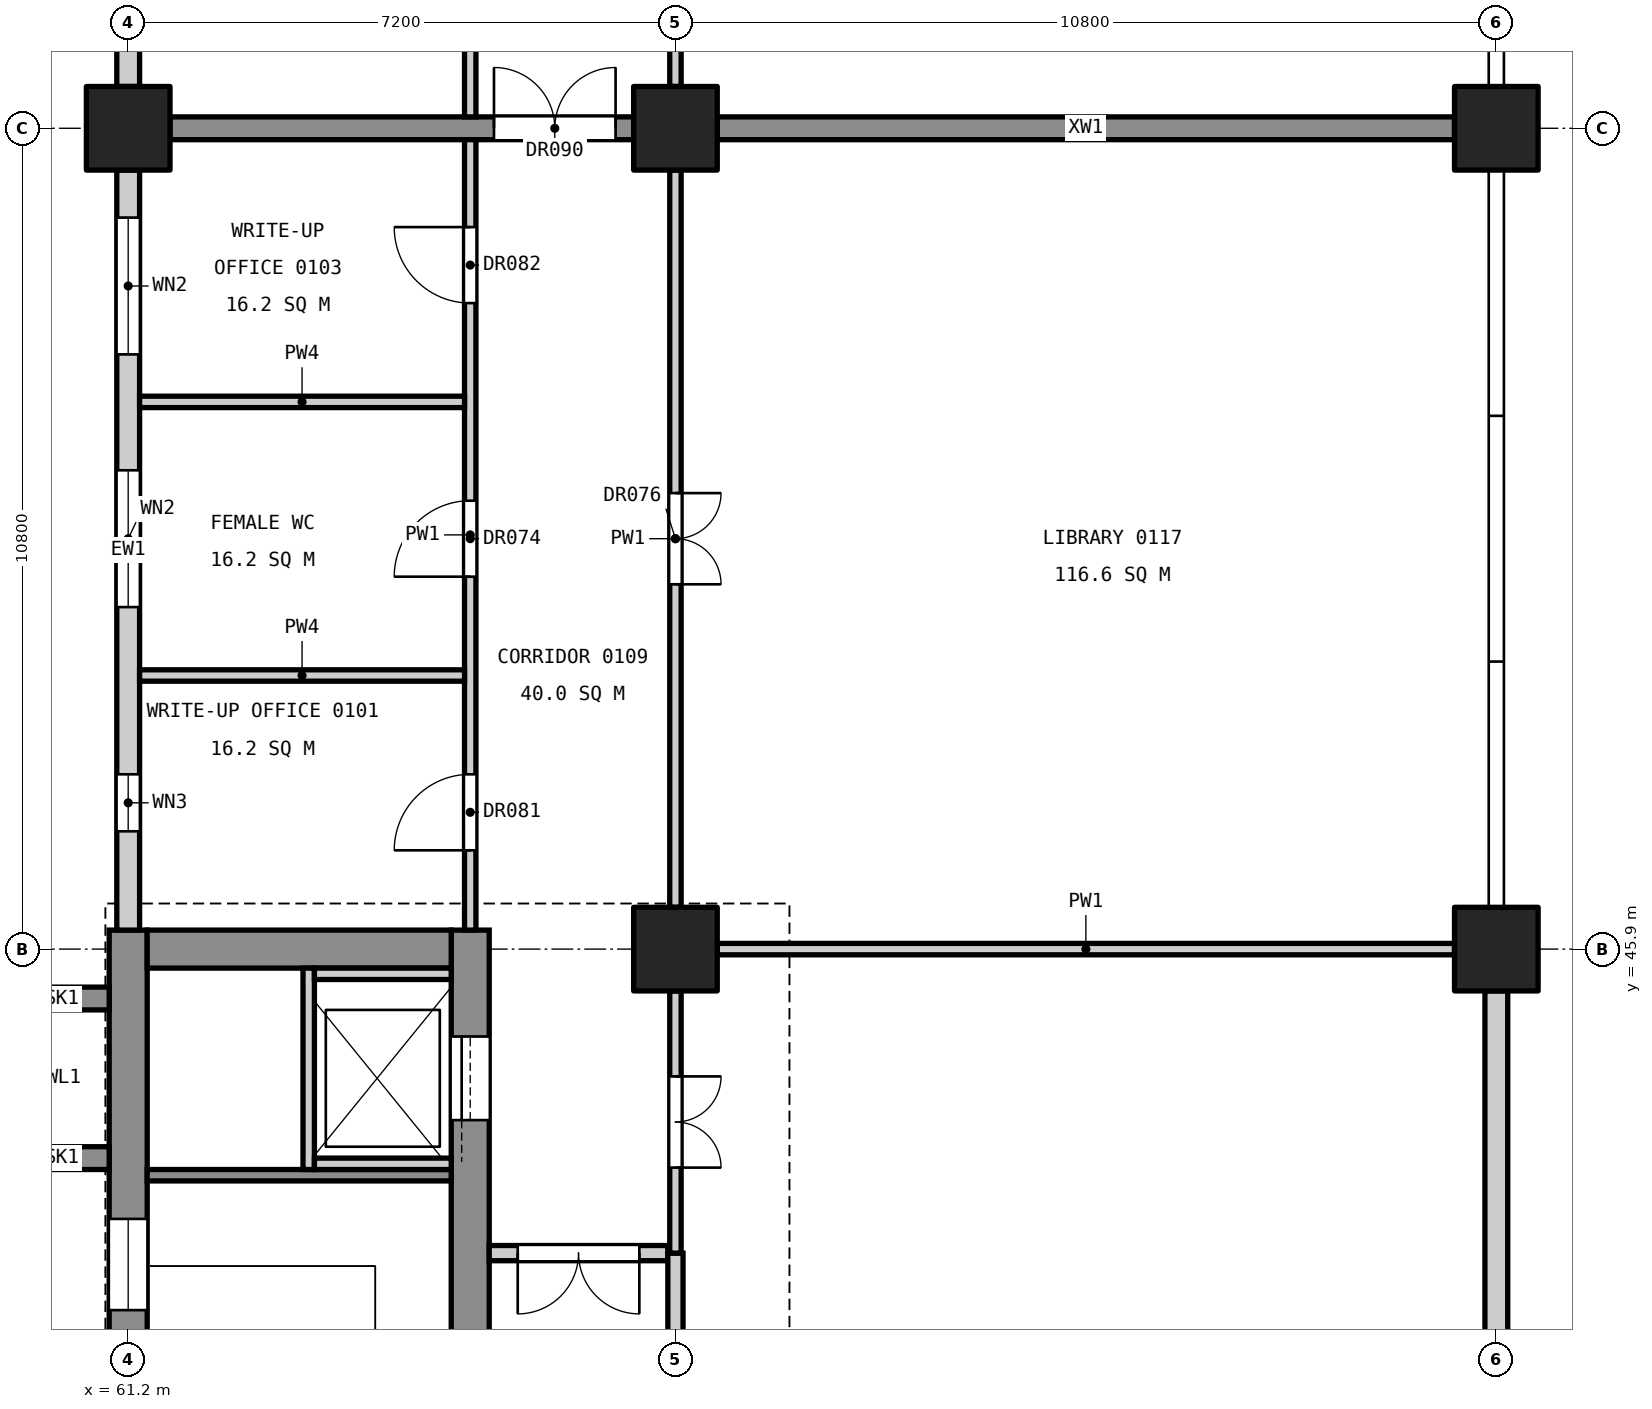
"""IFC4 building model, lengths in metres.
Left out: names, types, materials, properties, quantities, classifications, styles, units other than length and angle.
Written with IfcOpenShell. Run it as: python <this file> out.ifc"""

import sys

from ifc_helpers import new_model, si_unit, direction, frame, frame_2d, origin, origin_2d, place, context, subcontext, project, spatial, rectangle, extrude, element, fill, save


model = new_model("IFC4")
c1 = context("Model", 3, precision=1e-05, world=origin(), true_north=direction((0.0, 1.0)))
c2 = subcontext(c1, "Body", "Model", "MODEL_VIEW")
j1 = project(units=[si_unit("LENGTHUNIT", "METRE"), si_unit("PLANEANGLEUNIT", "RADIAN")], contexts=[c1])
p1 = place(None, origin())
s1 = spatial("IfcSite", under=j1, at=p1, CompositionType="ELEMENT")
p2 = place(p1, origin())
s2 = spatial("IfcBuilding", under=s1, at=p2, CompositionType="ELEMENT")
p3 = place(p2, frame((0.0, 0.0, 6.0)))
s3 = spatial("IfcBuildingStorey", under=s2, at=p3, CompositionType="ELEMENT", Elevation=6.0)
for number, where, z_axis, x_axis in (
    (1, (61.2, 56.7, 0.0), (0.0, 0.0, 1.0), (1.0, 0.0, 0.0)),
    (2, (68.4, 45.9, 0.0), (0.0, 0.0, 1.0), (1.0, 0.0, 0.0)),
    (3, (68.4, 56.7, 0.0), (0.0, 0.0, 1.0), (1.0, 0.0, 0.0)),
    (4, (79.2, 45.9, 0.0), (0.0, 0.0, 1.0), (1.0, 0.0, 0.0)),
    (5, (79.2, 56.7, 0.0), (0.0, 0.0, 1.0), (1.0, 0.0, 0.0)),
):
    element("IfcColumn", number, at=place(p3, frame(where, z_axis=z_axis, x_axis=x_axis)), inside=s3, PredefinedType="COLUMN", context=c2, shape_type="SweptSolid", body=[
        extrude(rectangle(XDim=1.1, YDim=1.1, at=origin_2d()), origin(), (0.0, 0.0, 1.0), 5.4),
    ])
p4 = place(p3, frame((61.2, 34.85, 0.0), z_axis=(0.0, 0.0, 1.0), x_axis=(0.0, 1.0, 0.0)))
e6 = element("IfcWall", 6, at=p4, inside=s3, PredefinedType="SHEAR", context=c2, shape_type="SweptSolid", body=[
    extrude(rectangle(XDim=11.3, YDim=0.5, at=frame_2d((5.65, 0.0))), origin(), (0.0, 0.0, 1.0), 5.1),
])
p5 = place(p4, frame((6.3, 0.0, 3.4)))
e7 = element("IfcOpeningElement", 7, at=p5, cuts=e6, PredefinedType="OPENING", context=c2, shape_type="SweptSolid", body=[
    extrude(rectangle(XDim=1.2, YDim=0.9, at=frame_2d((0.6, 0.45))), frame((0.0, 0.26, 0.0), z_axis=(0.0, -1.0, 0.0), x_axis=(1.0, 0.0, 0.0)), (0.0, 0.0, 1.0), 0.52),
])
p6 = place(p3, frame((65.7, 34.85, 0.0), z_axis=(0.0, 0.0, 1.0), x_axis=(0.0, 1.0, 0.0)))
e8 = element("IfcWall", 8, at=p6, inside=s3, PredefinedType="SHEAR", context=c2, shape_type="SweptSolid", body=[
    extrude(rectangle(XDim=11.3, YDim=0.5, at=frame_2d((5.65, 0.0))), origin(), (0.0, 0.0, 1.0), 5.1),
])
p7 = place(p6, frame((0.55, 0.0, 0.0)))
e9 = element("IfcOpeningElement", 9, at=p7, cuts=e8, PredefinedType="OPENING", context=c2, shape_type="SweptSolid", body=[
    extrude(rectangle(XDim=1.4, YDim=2.1, at=frame_2d((0.7, 1.05))), frame((0.0, 0.26, 0.0), z_axis=(0.0, -1.0, 0.0), x_axis=(1.0, 0.0, 0.0)), (0.0, 0.0, 1.0), 0.52),
])
p8 = place(p6, frame((8.8, 0.0, 0.0)))
e10 = element("IfcOpeningElement", 10, at=p8, cuts=e8, PredefinedType="OPENING", context=c2, shape_type="SweptSolid", body=[
    extrude(rectangle(XDim=1.1, YDim=2.1, at=frame_2d((0.55, 1.05))), frame((0.0, 0.26, 0.0), z_axis=(0.0, -1.0, 0.0), x_axis=(1.0, 0.0, 0.0)), (0.0, 0.0, 1.0), 0.52),
])
p9 = place(p3, frame((61.45, 45.9, 0.0), z_axis=(0.0, 0.0, 1.0), x_axis=(1.0, 0.0, 0.0)))
e11 = element("IfcWall", 11, at=p9, inside=s3, PredefinedType="SHEAR", context=c2, shape_type="SweptSolid", body=[
    extrude(rectangle(XDim=4.0, YDim=0.5, at=frame_2d((2.0, 0.0))), origin(), (0.0, 0.0, 1.0), 5.1),
])
for number, where, z_axis, x_axis in (
    (12, (60.95, 43.15, 0.0), (0.0, 0.0, 1.0), (-1.0, 0.0, 0.0)),
    (13, (60.95, 45.25, 0.0), (0.0, 0.0, 1.0), (-1.0, 0.0, 0.0)),
):
    element("IfcWall", number, at=place(p3, frame(where, z_axis=z_axis, x_axis=x_axis)), inside=s3, PredefinedType="SHEAR", context=c2, shape_type="SweptSolid", body=[
        extrude(rectangle(XDim=1.25, YDim=0.3, at=frame_2d((0.625, 0.0))), origin(), (0.0, 0.0, 1.0), 5.4),
    ])
p10 = place(p3, frame((61.75, 56.7, 0.0), z_axis=(0.0, 0.0, 1.0), x_axis=(1.0, 0.0, 0.0)))
e14 = element("IfcWall", 14, at=p10, inside=s3, PredefinedType="SHEAR", context=c2, shape_type="SweptSolid", body=[
    extrude(rectangle(XDim=6.1, YDim=0.3, at=frame_2d((3.05, 0.0))), origin(), (0.0, 0.0, 1.0), 5.1),
])
p11 = place(p10, frame((4.262, 0.0, 0.0)))
e15 = element("IfcOpeningElement", 15, at=p11, cuts=e14, PredefinedType="OPENING", context=c2, shape_type="SweptSolid", body=[
    extrude(rectangle(XDim=1.6, YDim=2.1, at=frame_2d((0.8, 1.05))), frame((0.0, 0.16, 0.0), z_axis=(0.0, -1.0, 0.0), x_axis=(1.0, 0.0, 0.0)), (0.0, 0.0, 1.0), 0.32),
])
p12 = place(p3, frame((68.95, 56.7, 0.0), z_axis=(0.0, 0.0, 1.0), x_axis=(1.0, 0.0, 0.0)))
e16 = element("IfcWall", 16, at=p12, inside=s3, PredefinedType="SHEAR", context=c2, shape_type="SweptSolid", body=[
    extrude(rectangle(XDim=9.7, YDim=0.3, at=frame_2d((4.85, 0.0))), origin(), (0.0, 0.0, 1.0), 5.1),
])
p13 = place(p3, frame((61.45, 42.925, 0.0), z_axis=(0.0, 0.0, 1.0), x_axis=(1.0, 0.0, 0.0)))
e17 = element("IfcWall", 17, at=p13, inside=s3, PredefinedType="SOLIDWALL", context=c2, shape_type="SweptSolid", body=[
    extrude(rectangle(XDim=4.0, YDim=0.15, at=frame_2d((2.0, 0.0))), origin(), (0.0, 0.0, 1.0), 5.1),
])
p14 = place(p3, frame((63.575, 43.0, 0.0), z_axis=(0.0, 0.0, 1.0), x_axis=(0.0, 1.0, 0.0)))
e18 = element("IfcWall", 18, at=p14, inside=s3, PredefinedType="SOLIDWALL", context=c2, shape_type="SweptSolid", body=[
    extrude(rectangle(XDim=2.65, YDim=0.15, at=frame_2d((1.325, 0.0))), origin(), (0.0, 0.0, 1.0), 5.4),
])
for number, where, z_axis, x_axis in (
    (19, (63.65, 43.075, 0.0), (0.0, 0.0, 1.0), (1.0, 0.0, 0.0)),
    (20, (63.65, 45.575, 0.0), (0.0, 0.0, 1.0), (1.0, 0.0, 0.0)),
):
    element("IfcWall", number, at=place(p3, frame(where, z_axis=z_axis, x_axis=x_axis)), inside=s3, PredefinedType="SOLIDWALL", context=c2, shape_type="SweptSolid", body=[
        extrude(rectangle(XDim=1.8, YDim=0.15, at=frame_2d((0.9, 0.0))), origin(), (0.0, 0.0, 1.0), 5.4),
    ])
p15 = place(p3, frame((61.2, 46.15, 0.0), z_axis=(0.0, 0.0, 1.0), x_axis=(0.0, 1.0, 0.0)))
e21 = element("IfcWall", 21, at=p15, inside=s3, PredefinedType="STANDARD", context=c2, shape_type="SweptSolid", body=[
    extrude(rectangle(XDim=10.0, YDim=0.3, at=frame_2d((5.0, 0.0))), origin(), (0.0, 0.0, 1.0), 4.1),
])
p16 = place(p15, frame((1.3, 0.0, 0.8)))
e22 = element("IfcOpeningElement", 22, at=p16, cuts=e21, PredefinedType="OPENING", context=c2, shape_type="SweptSolid", body=[
    extrude(rectangle(XDim=0.75, YDim=1.2, at=frame_2d((0.375, 0.6))), frame((0.0, 0.16, 0.0), z_axis=(0.0, -1.0, 0.0), x_axis=(1.0, 0.0, 0.0)), (0.0, 0.0, 1.0), 0.32),
])
p17 = place(p15, frame((4.25, 0.0, 0.9)))
e23 = element("IfcOpeningElement", 23, at=p17, cuts=e21, PredefinedType="OPENING", context=c2, shape_type="SweptSolid", body=[
    extrude(rectangle(XDim=1.8, YDim=3.0, at=frame_2d((0.9, 1.5))), frame((0.0, 0.16, 0.0), z_axis=(0.0, -1.0, 0.0), x_axis=(1.0, 0.0, 0.0)), (0.0, 0.0, 1.0), 0.32),
])
p18 = place(p15, frame((7.575, 0.0, 0.9)))
e24 = element("IfcOpeningElement", 24, at=p18, cuts=e21, PredefinedType="OPENING", context=c2, shape_type="SweptSolid", body=[
    extrude(rectangle(XDim=1.8, YDim=3.0, at=frame_2d((0.9, 1.5))), frame((0.0, 0.16, 0.0), z_axis=(0.0, -1.0, 0.0), x_axis=(1.0, 0.0, 0.0)), (0.0, 0.0, 1.0), 0.32),
])
p19 = place(p3, frame((61.2, 57.25, 0.0), z_axis=(0.0, 0.0, 1.0), x_axis=(0.0, 1.0, 0.0)))
e25 = element("IfcWall", 25, at=p19, inside=s3, PredefinedType="STANDARD", context=c2, shape_type="SweptSolid", body=[
    extrude(rectangle(XDim=2.8, YDim=0.3, at=frame_2d((1.4, 0.0))), origin(), (0.0, 0.0, 1.0), 4.1),
])
p20 = place(p19, frame((1.025, 0.0, 0.8)))
e26 = element("IfcOpeningElement", 26, at=p20, cuts=e25, PredefinedType="OPENING", context=c2, shape_type="SweptSolid", body=[
    extrude(rectangle(XDim=0.75, YDim=1.2, at=frame_2d((0.375, 0.6))), frame((0.0, 0.16, 0.0), z_axis=(0.0, -1.0, 0.0), x_axis=(1.0, 0.0, 0.0)), (0.0, 0.0, 1.0), 0.32),
])
p21 = place(p3, frame((79.2, 35.65, 0.0), z_axis=(0.0, 0.0, 1.0), x_axis=(0.0, 1.0, 0.0)))
e27 = element("IfcWall", 27, at=p21, inside=s3, PredefinedType="STANDARD", context=c2, shape_type="SweptSolid", body=[
    extrude(rectangle(XDim=9.7, YDim=0.3, at=frame_2d((4.85, 0.0))), origin(), (0.0, 0.0, 1.0), 4.0),
])
p22 = place(p3, frame((65.7, 46.15, 0.0), z_axis=(0.0, 0.0, 1.0), x_axis=(0.0, 1.0, 0.0)))
e28 = element("IfcWall", 28, at=p22, inside=s3, PredefinedType="PARTITIONING", context=c2, shape_type="SweptSolid", body=[
    extrude(rectangle(XDim=10.4, YDim=0.15, at=frame_2d((5.2, 0.0))), origin(), (0.0, 0.0, 1.0), 4.0),
])
p23 = place(p22, frame((4.65, 0.0, 0.0)))
e29 = element("IfcOpeningElement", 29, at=p23, cuts=e28, PredefinedType="OPENING", context=c2, shape_type="SweptSolid", body=[
    extrude(rectangle(XDim=1.0, YDim=2.1, at=frame_2d((0.5, 1.05))), frame((0.0, 0.085, 0.0), z_axis=(0.0, -1.0, 0.0), x_axis=(1.0, 0.0, 0.0)), (0.0, 0.0, 1.0), 0.17),
])
p24 = place(p22, frame((1.05, 0.0, 0.0)))
e30 = element("IfcOpeningElement", 30, at=p24, cuts=e28, PredefinedType="OPENING", context=c2, shape_type="SweptSolid", body=[
    extrude(rectangle(XDim=1.0, YDim=2.1, at=frame_2d((0.5, 1.05))), frame((0.0, 0.085, 0.0), z_axis=(0.0, -1.0, 0.0), x_axis=(1.0, 0.0, 0.0)), (0.0, 0.0, 1.0), 0.17),
])
p25 = place(p22, frame((8.25, 0.0, 0.0)))
e31 = element("IfcOpeningElement", 31, at=p25, cuts=e28, PredefinedType="OPENING", context=c2, shape_type="SweptSolid", body=[
    extrude(rectangle(XDim=1.0, YDim=2.1, at=frame_2d((0.5, 1.05))), frame((0.0, 0.085, 0.0), z_axis=(0.0, -1.0, 0.0), x_axis=(1.0, 0.0, 0.0)), (0.0, 0.0, 1.0), 0.17),
])
p26 = place(p3, frame((65.7, 56.85, 0.0), z_axis=(0.0, 0.0, 1.0), x_axis=(0.0, 1.0, 0.0)))
e32 = element("IfcWall", 32, at=p26, inside=s3, PredefinedType="PARTITIONING", context=c2, shape_type="SweptSolid", body=[
    extrude(rectangle(XDim=3.2, YDim=0.15, at=frame_2d((1.6, 0.0))), origin(), (0.0, 0.0, 1.0), 4.0),
])
p27 = place(p26, frame((1.15, 0.0, 0.0)))
e33 = element("IfcOpeningElement", 33, at=p27, cuts=e32, PredefinedType="OPENING", context=c2, shape_type="SweptSolid", body=[
    extrude(rectangle(XDim=1.0, YDim=2.1, at=frame_2d((0.5, 1.05))), frame((0.0, 0.085, 0.0), z_axis=(0.0, -1.0, 0.0), x_axis=(1.0, 0.0, 0.0)), (0.0, 0.0, 1.0), 0.17),
])
for number, where, z_axis, x_axis in (
    (34, (61.35, 49.5, 0.0), (0.0, 0.0, 1.0), (1.0, 0.0, 0.0)),
    (35, (61.35, 53.1, 0.0), (0.0, 0.0, 1.0), (1.0, 0.0, 0.0)),
):
    element("IfcWall", number, at=place(p3, frame(where, z_axis=z_axis, x_axis=x_axis)), inside=s3, PredefinedType="PARTITIONING", context=c2, shape_type="SweptSolid", body=[
        extrude(rectangle(XDim=4.275, YDim=0.15, at=frame_2d((2.137, 0.0))), origin(), (0.0, 0.0, 1.0), 4.3),
    ])
p28 = place(p3, frame((65.95, 41.9, 0.0), z_axis=(0.0, 0.0, 1.0), x_axis=(1.0, 0.0, 0.0)))
e36 = element("IfcWall", 36, at=p28, inside=s3, PredefinedType="PARTITIONING", context=c2, shape_type="SweptSolid", body=[
    extrude(rectangle(XDim=2.35, YDim=0.2, at=frame_2d((1.175, 0.0))), origin(), (0.0, 0.0, 1.0), 4.0),
])
p29 = place(p28, frame((0.375, 0.0, 0.0)))
e37 = element("IfcOpeningElement", 37, at=p29, cuts=e36, PredefinedType="OPENING", context=c2, shape_type="SweptSolid", body=[
    extrude(rectangle(XDim=1.6, YDim=2.1, at=frame_2d((0.8, 1.05))), frame((0.0, 0.11, 0.0), z_axis=(0.0, -1.0, 0.0), x_axis=(1.0, 0.0, 0.0)), (0.0, 0.0, 1.0), 0.22),
])
p30 = place(p3, frame((68.4, 35.65, 0.0), z_axis=(0.0, 0.0, 1.0), x_axis=(0.0, 1.0, 0.0)))
e38 = element("IfcWall", 38, at=p30, inside=s3, PredefinedType="PARTITIONING", context=c2, shape_type="SweptSolid", body=[
    extrude(rectangle(XDim=6.25, YDim=0.2, at=frame_2d((3.125, 0.0))), origin(), (0.0, 0.0, 1.0), 4.0),
])
p31 = place(p3, frame((68.4, 41.9, 0.0), z_axis=(0.0, 0.0, 1.0), x_axis=(0.0, 1.0, 0.0)))
e39 = element("IfcWall", 39, at=p31, inside=s3, PredefinedType="PARTITIONING", context=c2, shape_type="SweptSolid", body=[
    extrude(rectangle(XDim=3.45, YDim=0.15, at=frame_2d((1.725, 0.0))), origin(), (0.0, 0.0, 1.0), 4.0),
])
p32 = place(p31, frame((1.125, 0.0, 0.0)))
e40 = element("IfcOpeningElement", 40, at=p32, cuts=e39, PredefinedType="OPENING", context=c2, shape_type="SweptSolid", body=[
    extrude(rectangle(XDim=1.2, YDim=2.1, at=frame_2d((0.6, 1.05))), frame((0.0, 0.085, 0.0), z_axis=(0.0, -1.0, 0.0), x_axis=(1.0, 0.0, 0.0)), (0.0, 0.0, 1.0), 0.17),
])
p33 = place(p3, frame((68.4, 46.45, 0.0), z_axis=(0.0, 0.0, 1.0), x_axis=(0.0, 1.0, 0.0)))
e41 = element("IfcWall", 41, at=p33, inside=s3, PredefinedType="PARTITIONING", context=c2, shape_type="SweptSolid", body=[
    extrude(rectangle(XDim=9.7, YDim=0.15, at=frame_2d((4.85, 0.0))), origin(), (0.0, 0.0, 1.0), 4.0),
])
p34 = place(p33, frame((4.25, 0.0, 0.0)))
e42 = element("IfcOpeningElement", 42, at=p34, cuts=e41, PredefinedType="OPENING", context=c2, shape_type="SweptSolid", body=[
    extrude(rectangle(XDim=1.2, YDim=2.1, at=frame_2d((0.6, 1.05))), frame((0.0, 0.085, 0.0), z_axis=(0.0, -1.0, 0.0), x_axis=(1.0, 0.0, 0.0)), (0.0, 0.0, 1.0), 0.17),
])
p35 = place(p3, frame((68.4, 57.25, 0.0), z_axis=(0.0, 0.0, 1.0), x_axis=(0.0, 1.0, 0.0)))
e43 = element("IfcWall", 43, at=p35, inside=s3, PredefinedType="PARTITIONING", context=c2, shape_type="SweptSolid", body=[
    extrude(rectangle(XDim=3.05, YDim=0.15, at=frame_2d((1.525, 0.0))), origin(), (0.0, 0.0, 1.0), 4.0),
])
p36 = place(p3, frame((68.95, 45.9, 0.0), z_axis=(0.0, 0.0, 1.0), x_axis=(1.0, 0.0, 0.0)))
e44 = element("IfcWall", 44, at=p36, inside=s3, PredefinedType="PARTITIONING", context=c2, shape_type="SweptSolid", body=[
    extrude(rectangle(XDim=9.7, YDim=0.15, at=frame_2d((4.85, 0.0))), origin(), (0.0, 0.0, 1.0), 4.3),
])
p37 = place(p8, origin())
e45 = element("IfcDoor", 45, at=p37, inside=s3, OperationType="SLIDING_TO_LEFT", PredefinedType="DOOR", context=c2, shape_type="SweptSolid", body=[
    extrude(rectangle(XDim=1.1, YDim=2.1, at=frame_2d((0.55, 1.05))), frame((0.0, 0.025, 0.0), z_axis=(0.0, -1.0, 0.0), x_axis=(1.0, 0.0, 0.0)), (0.0, 0.0, 1.0), 0.05),
])
fill(e10, e45)
p38 = place(p16, origin())
e46 = element("IfcWindow", 46, at=p38, inside=s3, PartitioningType="SINGLE_PANEL", PredefinedType="WINDOW", context=c2, shape_type="SweptSolid", body=[
    extrude(rectangle(XDim=0.75, YDim=1.2, at=frame_2d((0.375, 0.6))), frame((0.0, 0.03, 0.0), z_axis=(0.0, -1.0, 0.0), x_axis=(1.0, 0.0, 0.0)), (0.0, 0.0, 1.0), 0.06),
])
fill(e22, e46)
p39 = place(p17, origin())
e47 = element("IfcWindow", 47, at=p39, inside=s3, PartitioningType="SINGLE_PANEL", PredefinedType="WINDOW", context=c2, shape_type="SweptSolid", body=[
    extrude(rectangle(XDim=1.8, YDim=3.0, at=frame_2d((0.9, 1.5))), frame((0.0, 0.03, 0.0), z_axis=(0.0, -1.0, 0.0), x_axis=(1.0, 0.0, 0.0)), (0.0, 0.0, 1.0), 0.06),
])
fill(e23, e47)
p40 = place(p18, origin())
e48 = element("IfcWindow", 48, at=p40, inside=s3, PartitioningType="SINGLE_PANEL", PredefinedType="WINDOW", context=c2, shape_type="SweptSolid", body=[
    extrude(rectangle(XDim=1.8, YDim=3.0, at=frame_2d((0.9, 1.5))), frame((0.0, 0.03, 0.0), z_axis=(0.0, -1.0, 0.0), x_axis=(1.0, 0.0, 0.0)), (0.0, 0.0, 1.0), 0.06),
])
fill(e24, e48)
p41 = place(p5, origin())
e49 = element("IfcWindow", 49, at=p41, inside=s3, PartitioningType="SINGLE_PANEL", PredefinedType="WINDOW", context=c2, shape_type="SweptSolid", body=[
    extrude(rectangle(XDim=1.2, YDim=0.9, at=frame_2d((0.6, 0.45))), frame((0.0, 0.03, 0.0), z_axis=(0.0, -1.0, 0.0), x_axis=(1.0, 0.0, 0.0)), (0.0, 0.0, 1.0), 0.06),
])
fill(e7, e49)
p42 = place(p23, origin())
e50 = element("IfcDoor", 50, at=p42, inside=s3, OperationType="SINGLE_SWING_LEFT", PredefinedType="DOOR", context=c2, shape_type="SweptSolid", body=[
    extrude(rectangle(XDim=1.0, YDim=2.1, at=frame_2d((0.5, 1.05))), frame((0.0, 0.025, 0.0), z_axis=(0.0, -1.0, 0.0), x_axis=(1.0, 0.0, 0.0)), (0.0, 0.0, 1.0), 0.05),
])
fill(e29, e50)
p43 = place(p32, frame((1.2, 0.0, 0.0), z_axis=(0.0, 0.0, 1.0), x_axis=(-1.0, 0.0, 0.0)))
e51 = element("IfcDoor", 51, at=p43, inside=s3, OperationType="DOUBLE_DOOR_SINGLE_SWING", PredefinedType="DOOR", context=c2, shape_type="SweptSolid", body=[
    extrude(rectangle(XDim=1.2, YDim=2.1, at=frame_2d((0.6, 1.05))), frame((0.0, 0.025, 0.0), z_axis=(0.0, -1.0, 0.0), x_axis=(1.0, 0.0, 0.0)), (0.0, 0.0, 1.0), 0.05),
])
fill(e40, e51)
p44 = place(p34, frame((1.2, 0.0, 0.0), z_axis=(0.0, 0.0, 1.0), x_axis=(-1.0, 0.0, 0.0)))
e52 = element("IfcDoor", 52, at=p44, inside=s3, OperationType="DOUBLE_DOOR_SINGLE_SWING", PredefinedType="DOOR", context=c2, shape_type="SweptSolid", body=[
    extrude(rectangle(XDim=1.2, YDim=2.1, at=frame_2d((0.6, 1.05))), frame((0.0, 0.025, 0.0), z_axis=(0.0, -1.0, 0.0), x_axis=(1.0, 0.0, 0.0)), (0.0, 0.0, 1.0), 0.05),
])
fill(e42, e52)
p45 = place(p24, origin())
e53 = element("IfcDoor", 53, at=p45, inside=s3, OperationType="SINGLE_SWING_LEFT", PredefinedType="DOOR", context=c2, shape_type="SweptSolid", body=[
    extrude(rectangle(XDim=1.0, YDim=2.1, at=frame_2d((0.5, 1.05))), frame((0.0, 0.025, 0.0), z_axis=(0.0, -1.0, 0.0), x_axis=(1.0, 0.0, 0.0)), (0.0, 0.0, 1.0), 0.05),
])
fill(e30, e53)
p46 = place(p25, origin())
e54 = element("IfcDoor", 54, at=p46, inside=s3, OperationType="SINGLE_SWING_RIGHT", PredefinedType="DOOR", context=c2, shape_type="SweptSolid", body=[
    extrude(rectangle(XDim=1.0, YDim=2.1, at=frame_2d((0.5, 1.05))), frame((0.0, 0.025, 0.0), z_axis=(0.0, -1.0, 0.0), x_axis=(1.0, 0.0, 0.0)), (0.0, 0.0, 1.0), 0.05),
])
fill(e31, e54)
p47 = place(p29, frame((1.6, 0.0, 0.0), z_axis=(0.0, 0.0, 1.0), x_axis=(-1.0, 0.0, 0.0)))
e55 = element("IfcDoor", 55, at=p47, inside=s3, OperationType="DOUBLE_DOOR_SINGLE_SWING", PredefinedType="DOOR", context=c2, shape_type="SweptSolid", body=[
    extrude(rectangle(XDim=1.6, YDim=2.1, at=frame_2d((0.8, 1.05))), frame((0.0, 0.025, 0.0), z_axis=(0.0, -1.0, 0.0), x_axis=(1.0, 0.0, 0.0)), (0.0, 0.0, 1.0), 0.05),
])
fill(e37, e55)
p48 = place(p11, origin())
e56 = element("IfcDoor", 56, at=p48, inside=s3, OperationType="DOUBLE_DOOR_SINGLE_SWING", PredefinedType="DOOR", context=c2, shape_type="SweptSolid", body=[
    extrude(rectangle(XDim=1.6, YDim=2.1, at=frame_2d((0.8, 1.05))), frame((0.0, 0.025, 0.0), z_axis=(0.0, -1.0, 0.0), x_axis=(1.0, 0.0, 0.0)), (0.0, 0.0, 1.0), 0.05),
])
fill(e15, e56)
save(model, sys.argv[1])
